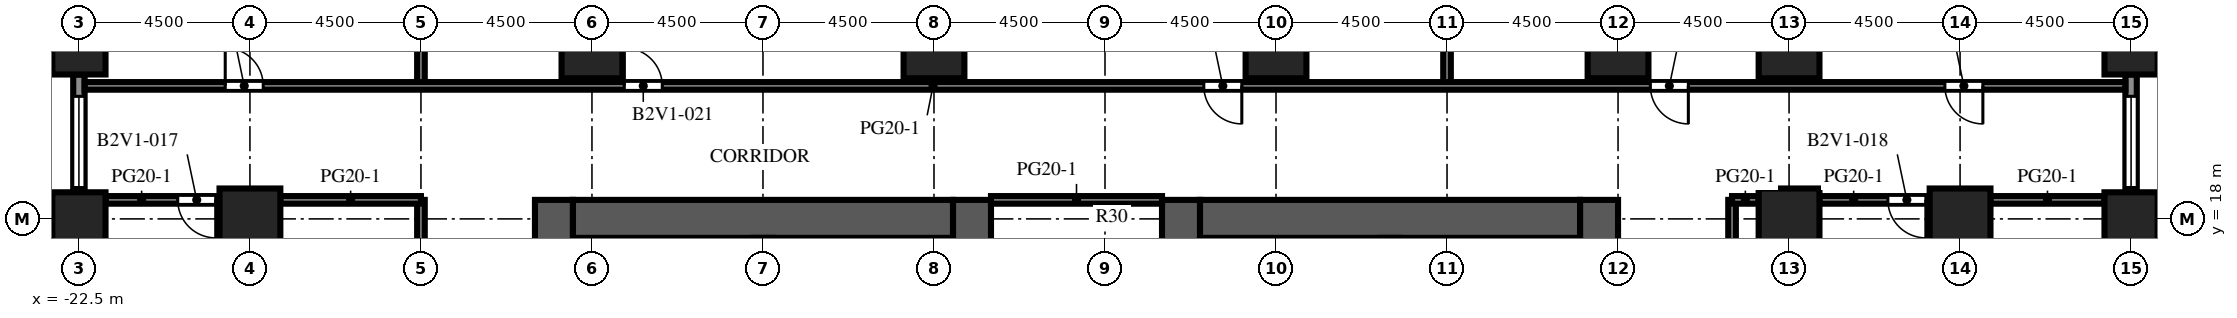
"""IFC4 building model, lengths in metres.
Left out: names, types, materials, properties, quantities, classifications, styles, units other than length and angle.
Written with IfcOpenShell. Run it as: python <this file> out.ifc"""

import sys

from ifc_helpers import new_model, si_unit, direction, frame, frame_2d, origin, origin_2d, place, context, subcontext, project, spatial, rectangle, extrude, element, fill, save


model = new_model("IFC4")
c1 = context("Model", 3, precision=1e-05, world=origin(), true_north=direction((0.0, 1.0)))
c2 = subcontext(c1, "Body", "Model", "MODEL_VIEW")
j1 = project(units=[si_unit("LENGTHUNIT", "METRE"), si_unit("PLANEANGLEUNIT", "RADIAN")], contexts=[c1])
p1 = place(None, origin())
s1 = spatial("IfcSite", under=j1, at=p1, CompositionType="ELEMENT")
p2 = place(p1, origin())
s2 = spatial("IfcBuilding", under=s1, at=p2, CompositionType="ELEMENT")
p3 = place(p2, frame((0.0, 0.0, 54.2)))
s3 = spatial("IfcBuildingStorey", under=s2, at=p3, CompositionType="ELEMENT", Elevation=54.2)
for number, where, z_axis, x_axis in (
    (1, (-22.5, 18.0, 0.0), (0.0, 0.0, 1.0), (1.0, 0.0, 0.0)),
    (2, (-22.5, 22.5, 0.0), (0.0, 0.0, 1.0), (1.0, 0.0, 0.0)),
    (3, (31.5, 18.0, 0.0), (0.0, 0.0, 1.0), (1.0, 0.0, 0.0)),
    (4, (31.5, 22.5, 0.0), (0.0, 0.0, 1.0), (1.0, 0.0, 0.0)),
):
    element("IfcColumn", number, at=place(p3, frame(where, z_axis=z_axis, x_axis=x_axis)), inside=s3, PredefinedType="COLUMN", context=c2, shape_type="SweptSolid", body=[
        extrude(rectangle(XDim=1.4, YDim=1.4, at=origin_2d()), origin(), (0.0, 0.0, 1.0), 4.1),
    ])
for number, where, z_axis, x_axis in (
    (5, (-18.0, 18.0, 0.0), (0.0, 0.0, 1.0), (1.0, 0.0, 0.0)),
    (6, (-9.0, 22.5, 0.0), (0.0, 0.0, 1.0), (1.0, 0.0, 0.0)),
    (7, (0.0, 22.5, 0.0), (0.0, 0.0, 1.0), (1.0, 0.0, 0.0)),
    (8, (9.0, 22.5, 0.0), (0.0, 0.0, 1.0), (1.0, 0.0, 0.0)),
    (9, (18.0, 22.5, 0.0), (0.0, 0.0, 1.0), (1.0, 0.0, 0.0)),
    (10, (22.5, 18.0, 0.0), (0.0, 0.0, 1.0), (1.0, 0.0, 0.0)),
    (11, (22.5, 22.5, 0.0), (0.0, 0.0, 1.0), (1.0, 0.0, 0.0)),
    (12, (27.0, 18.0, 0.0), (0.0, 0.0, 1.0), (1.0, 0.0, 0.0)),
):
    element("IfcColumn", number, at=place(p3, frame(where, z_axis=z_axis, x_axis=x_axis)), inside=s3, PredefinedType="COLUMN", context=c2, shape_type="SweptSolid", body=[
        extrude(rectangle(XDim=1.6, YDim=1.6, at=origin_2d()), origin(), (0.0, 0.0, 1.0), 4.1),
    ])
p4 = place(p3, frame((-10.0, -9.0, 0.0), z_axis=(0.0, 0.0, 1.0), x_axis=(0.0, 1.0, 0.0)))
e13 = element("IfcWall", 13, at=p4, inside=s3, PredefinedType="SHEAR", context=c2, shape_type="SweptSolid", body=[
    extrude(rectangle(XDim=27.5, YDim=1.0, at=frame_2d((13.75, 0.0))), origin(), (0.0, 0.0, 1.0), 4.1),
])
p5 = place(p4, frame((12.55, 0.0, 0.0)))
e14 = element("IfcOpeningElement", 14, at=p5, cuts=e13, PredefinedType="OPENING", context=c2, shape_type="SweptSolid", body=[
    extrude(rectangle(XDim=2.4, YDim=2.4, at=frame_2d((1.2, 1.2))), frame((0.0, 0.51, 0.0), z_axis=(0.0, -1.0, 0.0), x_axis=(1.0, 0.0, 0.0)), (0.0, 0.0, 1.0), 1.02),
])
p6 = place(p4, frame((6.825, 0.0, 0.0)))
e15 = element("IfcOpeningElement", 15, at=p6, cuts=e13, PredefinedType="OPENING", context=c2, shape_type="SweptSolid", body=[
    extrude(rectangle(XDim=1.2, YDim=2.1, at=frame_2d((0.6, 1.05))), frame((0.0, 0.51, 0.0), z_axis=(0.0, -1.0, 0.0), x_axis=(1.0, 0.0, 0.0)), (0.0, 0.0, 1.0), 1.02),
])
p7 = place(p4, frame((19.475, 0.0, 0.0)))
e16 = element("IfcOpeningElement", 16, at=p7, cuts=e13, PredefinedType="OPENING", context=c2, shape_type="SweptSolid", body=[
    extrude(rectangle(XDim=1.2, YDim=2.1, at=frame_2d((0.6, 1.05))), frame((0.0, 0.51, 0.0), z_axis=(0.0, -1.0, 0.0), x_axis=(1.0, 0.0, 0.0)), (0.0, 0.0, 1.0), 1.02),
])
p8 = place(p3, frame((1.0, -9.0, 0.0), z_axis=(0.0, 0.0, 1.0), x_axis=(0.0, 1.0, 0.0)))
e17 = element("IfcWall", 17, at=p8, inside=s3, PredefinedType="SHEAR", context=c2, shape_type="SweptSolid", body=[
    extrude(rectangle(XDim=27.5, YDim=1.0, at=frame_2d((13.75, 0.0))), origin(), (0.0, 0.0, 1.0), 4.1),
])
p9 = place(p8, frame((12.55, 0.0, 0.0)))
e18 = element("IfcOpeningElement", 18, at=p9, cuts=e17, PredefinedType="OPENING", context=c2, shape_type="SweptSolid", body=[
    extrude(rectangle(XDim=2.4, YDim=2.4, at=frame_2d((1.2, 1.2))), frame((0.0, 0.51, 0.0), z_axis=(0.0, -1.0, 0.0), x_axis=(1.0, 0.0, 0.0)), (0.0, 0.0, 1.0), 1.02),
])
p10 = place(p8, frame((4.025, 0.0, 0.0)))
e19 = element("IfcOpeningElement", 19, at=p10, cuts=e17, PredefinedType="OPENING", context=c2, shape_type="SweptSolid", body=[
    extrude(rectangle(XDim=1.2, YDim=2.1, at=frame_2d((0.6, 1.05))), frame((0.0, 0.51, 0.0), z_axis=(0.0, -1.0, 0.0), x_axis=(1.0, 0.0, 0.0)), (0.0, 0.0, 1.0), 1.02),
])
p11 = place(p8, frame((22.275, 0.0, 0.0)))
e20 = element("IfcOpeningElement", 20, at=p11, cuts=e17, PredefinedType="OPENING", context=c2, shape_type="SweptSolid", body=[
    extrude(rectangle(XDim=1.2, YDim=2.1, at=frame_2d((0.6, 1.05))), frame((0.0, 0.51, 0.0), z_axis=(0.0, -1.0, 0.0), x_axis=(1.0, 0.0, 0.0)), (0.0, 0.0, 1.0), 1.02),
])
p12 = place(p3, frame((-9.5, 18.0, 0.0), z_axis=(0.0, 0.0, 1.0), x_axis=(1.0, 0.0, 0.0)))
e21 = element("IfcWall", 21, at=p12, inside=s3, PredefinedType="SHEAR", context=c2, shape_type="SweptSolid", body=[
    extrude(rectangle(XDim=10.0, YDim=1.0, at=frame_2d((5.0, 0.0))), origin(), (0.0, 0.0, 1.0), 4.1),
])
p13 = place(p3, frame((6.5, -9.0, 0.0), z_axis=(0.0, 0.0, 1.0), x_axis=(0.0, 1.0, 0.0)))
e22 = element("IfcWall", 22, at=p13, inside=s3, PredefinedType="SHEAR", context=c2, shape_type="SweptSolid", body=[
    extrude(rectangle(XDim=27.5, YDim=1.0, at=frame_2d((13.75, 0.0))), origin(), (0.0, 0.0, 1.0), 4.1),
])
p14 = place(p13, frame((12.55, 0.0, 0.0)))
e23 = element("IfcOpeningElement", 23, at=p14, cuts=e22, PredefinedType="OPENING", context=c2, shape_type="SweptSolid", body=[
    extrude(rectangle(XDim=2.4, YDim=2.4, at=frame_2d((1.2, 1.2))), frame((0.0, 0.51, 0.0), z_axis=(0.0, -1.0, 0.0), x_axis=(1.0, 0.0, 0.0)), (0.0, 0.0, 1.0), 1.02),
])
p15 = place(p13, frame((4.025, 0.0, 0.0)))
e24 = element("IfcOpeningElement", 24, at=p15, cuts=e22, PredefinedType="OPENING", context=c2, shape_type="SweptSolid", body=[
    extrude(rectangle(XDim=1.2, YDim=2.1, at=frame_2d((0.6, 1.05))), frame((0.0, 0.51, 0.0), z_axis=(0.0, -1.0, 0.0), x_axis=(1.0, 0.0, 0.0)), (0.0, 0.0, 1.0), 1.02),
])
p16 = place(p13, frame((22.275, 0.0, 0.0)))
e25 = element("IfcOpeningElement", 25, at=p16, cuts=e22, PredefinedType="OPENING", context=c2, shape_type="SweptSolid", body=[
    extrude(rectangle(XDim=1.2, YDim=2.1, at=frame_2d((0.6, 1.05))), frame((0.0, 0.51, 0.0), z_axis=(0.0, -1.0, 0.0), x_axis=(1.0, 0.0, 0.0)), (0.0, 0.0, 1.0), 1.02),
])
p17 = place(p3, frame((17.5, -9.0, 0.0), z_axis=(0.0, 0.0, 1.0), x_axis=(0.0, 1.0, 0.0)))
e26 = element("IfcWall", 26, at=p17, inside=s3, PredefinedType="SHEAR", context=c2, shape_type="SweptSolid", body=[
    extrude(rectangle(XDim=27.5, YDim=1.0, at=frame_2d((13.75, 0.0))), origin(), (0.0, 0.0, 1.0), 4.1),
])
p18 = place(p17, frame((12.55, 0.0, 0.0)))
e27 = element("IfcOpeningElement", 27, at=p18, cuts=e26, PredefinedType="OPENING", context=c2, shape_type="SweptSolid", body=[
    extrude(rectangle(XDim=2.4, YDim=2.4, at=frame_2d((1.2, 1.2))), frame((0.0, 0.51, 0.0), z_axis=(0.0, -1.0, 0.0), x_axis=(1.0, 0.0, 0.0)), (0.0, 0.0, 1.0), 1.02),
])
p19 = place(p17, frame((6.825, 0.0, 0.0)))
e28 = element("IfcOpeningElement", 28, at=p19, cuts=e26, PredefinedType="OPENING", context=c2, shape_type="SweptSolid", body=[
    extrude(rectangle(XDim=1.2, YDim=2.1, at=frame_2d((0.6, 1.05))), frame((0.0, 0.51, 0.0), z_axis=(0.0, -1.0, 0.0), x_axis=(1.0, 0.0, 0.0)), (0.0, 0.0, 1.0), 1.02),
])
p20 = place(p17, frame((19.475, 0.0, 0.0)))
e29 = element("IfcOpeningElement", 29, at=p20, cuts=e26, PredefinedType="OPENING", context=c2, shape_type="SweptSolid", body=[
    extrude(rectangle(XDim=1.2, YDim=2.1, at=frame_2d((0.6, 1.05))), frame((0.0, 0.51, 0.0), z_axis=(0.0, -1.0, 0.0), x_axis=(1.0, 0.0, 0.0)), (0.0, 0.0, 1.0), 1.02),
])
p21 = place(p3, frame((7.0, 18.0, 0.0), z_axis=(0.0, 0.0, 1.0), x_axis=(1.0, 0.0, 0.0)))
e30 = element("IfcWall", 30, at=p21, inside=s3, PredefinedType="SHEAR", context=c2, shape_type="SweptSolid", body=[
    extrude(rectangle(XDim=10.0, YDim=1.0, at=frame_2d((5.0, 0.0))), origin(), (0.0, 0.0, 1.0), 4.1),
])
p22 = place(p3, frame((31.5, 21.8, 0.0), z_axis=(0.0, 0.0, 1.0), x_axis=(0.0, -1.0, 0.0)))
e31 = element("IfcWall", 31, at=p22, inside=s3, PredefinedType="SOLIDWALL", context=c2, shape_type="SweptSolid", body=[
    extrude(rectangle(XDim=3.1, YDim=0.3, at=frame_2d((1.55, 0.0))), origin(), (0.0, 0.0, 1.0), 2.75),
])
p23 = place(p22, frame((0.575, 0.0, 0.8)))
e32 = element("IfcOpeningElement", 32, at=p23, cuts=e31, PredefinedType="OPENING", context=c2, shape_type="SweptSolid", body=[
    extrude(rectangle(XDim=2.4, YDim=1.7, at=frame_2d((1.2, 0.85))), frame((0.0, 0.16, 0.0), z_axis=(0.0, -1.0, 0.0), x_axis=(1.0, 0.0, 0.0)), (0.0, 0.0, 1.0), 0.32),
])
p24 = place(p3, frame((-22.5, 18.7, 0.0), z_axis=(0.0, 0.0, 1.0), x_axis=(0.0, 1.0, 0.0)))
e33 = element("IfcWall", 33, at=p24, inside=s3, PredefinedType="SOLIDWALL", context=c2, shape_type="SweptSolid", body=[
    extrude(rectangle(XDim=3.1, YDim=0.3, at=frame_2d((1.55, 0.0))), origin(), (0.0, 0.0, 1.0), 2.75),
])
p25 = place(p24, frame((0.125, 0.0, 0.8)))
e34 = element("IfcOpeningElement", 34, at=p25, cuts=e33, PredefinedType="OPENING", context=c2, shape_type="SweptSolid", body=[
    extrude(rectangle(XDim=2.4, YDim=1.7, at=frame_2d((1.2, 0.85))), frame((0.0, 0.16, 0.0), z_axis=(0.0, -1.0, 0.0), x_axis=(1.0, 0.0, 0.0)), (0.0, 0.0, 1.0), 0.32),
])
p26 = place(p3, frame((-13.5, -9.0, 0.0), z_axis=(0.0, 0.0, 1.0), x_axis=(0.0, 1.0, 0.0)))
e35 = element("IfcWall", 35, at=p26, inside=s3, PredefinedType="PARTITIONING", context=c2, shape_type="SweptSolid", body=[
    extrude(rectangle(XDim=27.5, YDim=0.2, at=frame_2d((13.75, 0.0))), origin(), (0.0, 0.0, 1.0), 3.65),
])
p27 = place(p26, frame((5.1, 0.0, 0.0)))
e36 = element("IfcOpeningElement", 36, at=p27, cuts=e35, PredefinedType="OPENING", context=c2, shape_type="SweptSolid", body=[
    extrude(rectangle(XDim=1.0, YDim=2.1, at=frame_2d((0.5, 1.05))), frame((0.0, 0.11, 0.0), z_axis=(0.0, -1.0, 0.0), x_axis=(1.0, 0.0, 0.0)), (0.0, 0.0, 1.0), 0.22),
])
p28 = place(p26, frame((15.6, 0.0, 0.0)))
e37 = element("IfcOpeningElement", 37, at=p28, cuts=e35, PredefinedType="OPENING", context=c2, shape_type="SweptSolid", body=[
    extrude(rectangle(XDim=1.0, YDim=2.1, at=frame_2d((0.5, 1.05))), frame((0.0, 0.11, 0.0), z_axis=(0.0, -1.0, 0.0), x_axis=(1.0, 0.0, 0.0)), (0.0, 0.0, 1.0), 0.22),
])
for number, where, z_axis, x_axis in (
    (38, (-13.5, 21.5, 0.0), (0.0, 0.0, 1.0), (0.0, 1.0, 0.0)),
    (39, (13.5, 21.5, 0.0), (0.0, 0.0, 1.0), (0.0, 1.0, 0.0)),
):
    element("IfcWall", number, at=place(p3, frame(where, z_axis=z_axis, x_axis=x_axis)), inside=s3, PredefinedType="PARTITIONING", context=c2, shape_type="SweptSolid", body=[
        extrude(rectangle(XDim=4.8, YDim=0.2, at=frame_2d((2.4, 0.0))), origin(), (0.0, 0.0, 1.0), 3.65),
    ])
p29 = place(p3, frame((21.0, 18.5, 0.0), z_axis=(0.0, 0.0, 1.0), x_axis=(0.0, -1.0, 0.0)))
e40 = element("IfcWall", 40, at=p29, inside=s3, PredefinedType="PARTITIONING", context=c2, shape_type="SweptSolid", body=[
    extrude(rectangle(XDim=27.5, YDim=0.2, at=frame_2d((13.75, 0.0))), origin(), (0.0, 0.0, 1.0), 3.65),
])
p30 = place(p29, frame((10.9, 0.0, 0.0)))
e41 = element("IfcOpeningElement", 41, at=p30, cuts=e40, PredefinedType="OPENING", context=c2, shape_type="SweptSolid", body=[
    extrude(rectangle(XDim=1.0, YDim=2.1, at=frame_2d((0.5, 1.05))), frame((0.0, 0.11, 0.0), z_axis=(0.0, -1.0, 0.0), x_axis=(1.0, 0.0, 0.0)), (0.0, 0.0, 1.0), 0.22),
])
p31 = place(p3, frame((-18.8, 18.5, 0.0), z_axis=(0.0, 0.0, 1.0), x_axis=(-1.0, 0.0, 0.0)))
e42 = element("IfcWall", 42, at=p31, inside=s3, PredefinedType="PARTITIONING", context=c2, shape_type="SweptSolid", body=[
    extrude(rectangle(XDim=3.0, YDim=0.2, at=frame_2d((1.5, 0.0))), origin(), (0.0, 0.0, 1.0), 3.65),
])
p32 = place(p31, frame((0.1, 0.0, 0.0)))
e43 = element("IfcOpeningElement", 43, at=p32, cuts=e42, PredefinedType="OPENING", context=c2, shape_type="SweptSolid", body=[
    extrude(rectangle(XDim=1.0, YDim=2.1, at=frame_2d((0.5, 1.05))), frame((0.0, 0.11, 0.0), z_axis=(0.0, -1.0, 0.0), x_axis=(1.0, 0.0, 0.0)), (0.0, 0.0, 1.0), 0.22),
])
p33 = place(p3, frame((-17.2, 18.5, 0.0), z_axis=(0.0, 0.0, 1.0), x_axis=(1.0, 0.0, 0.0)))
e44 = element("IfcWall", 44, at=p33, inside=s3, PredefinedType="PARTITIONING", context=c2, shape_type="SweptSolid", body=[
    extrude(rectangle(XDim=3.7, YDim=0.2, at=frame_2d((1.85, 0.0))), origin(), (0.0, 0.0, 1.0), 3.65),
])
p34 = place(p3, frame((1.5, 18.5, 0.0), z_axis=(0.0, 0.0, 1.0), x_axis=(1.0, 0.0, 0.0)))
e45 = element("IfcWall", 45, at=p34, inside=s3, PredefinedType="PARTITIONING", context=c2, shape_type="SweptSolid", body=[
    extrude(rectangle(XDim=4.5, YDim=0.2, at=frame_2d((2.25, 0.0))), origin(), (0.0, 0.0, 1.0), 3.65),
])
p35 = place(p3, frame((21.0, 18.5, 0.0), z_axis=(0.0, 0.0, 1.0), x_axis=(1.0, 0.0, 0.0)))
e46 = element("IfcWall", 46, at=p35, inside=s3, PredefinedType="PARTITIONING", context=c2, shape_type="SweptSolid", body=[
    extrude(rectangle(XDim=0.7, YDim=0.2, at=frame_2d((0.35, 0.0))), origin(), (0.0, 0.0, 1.0), 3.65),
])
p36 = place(p3, frame((26.2, 18.5, 0.0), z_axis=(0.0, 0.0, 1.0), x_axis=(-1.0, 0.0, 0.0)))
e47 = element("IfcWall", 47, at=p36, inside=s3, PredefinedType="PARTITIONING", context=c2, shape_type="SweptSolid", body=[
    extrude(rectangle(XDim=2.9, YDim=0.2, at=frame_2d((1.45, 0.0))), origin(), (0.0, 0.0, 1.0), 3.65),
])
p37 = place(p36, frame((0.1, 0.0, 0.0)))
e48 = element("IfcOpeningElement", 48, at=p37, cuts=e47, PredefinedType="OPENING", context=c2, shape_type="SweptSolid", body=[
    extrude(rectangle(XDim=1.0, YDim=2.1, at=frame_2d((0.5, 1.05))), frame((0.0, 0.11, 0.0), z_axis=(0.0, -1.0, 0.0), x_axis=(1.0, 0.0, 0.0)), (0.0, 0.0, 1.0), 0.22),
])
p38 = place(p3, frame((27.8, 18.5, 0.0), z_axis=(0.0, 0.0, 1.0), x_axis=(1.0, 0.0, 0.0)))
e49 = element("IfcWall", 49, at=p38, inside=s3, PredefinedType="PARTITIONING", context=c2, shape_type="SweptSolid", body=[
    extrude(rectangle(XDim=3.0, YDim=0.2, at=frame_2d((1.5, 0.0))), origin(), (0.0, 0.0, 1.0), 3.65),
])
p39 = place(p3, frame((-22.35, 21.5, 0.0), z_axis=(0.0, 0.0, 1.0), x_axis=(1.0, 0.0, 0.0)))
e50 = element("IfcWall", 50, at=p39, inside=s3, PredefinedType="PARTITIONING", context=c2, shape_type="SweptSolid", body=[
    extrude(rectangle(XDim=53.7, YDim=0.2, at=frame_2d((26.85, 0.0))), origin(), (0.0, 0.0, 1.0), 3.65),
])
p40 = place(p39, frame((3.7, 0.0, 0.0)))
e51 = element("IfcOpeningElement", 51, at=p40, cuts=e50, PredefinedType="OPENING", context=c2, shape_type="SweptSolid", body=[
    extrude(rectangle(XDim=1.0, YDim=2.1, at=frame_2d((0.5, 1.05))), frame((0.0, 0.11, 0.0), z_axis=(0.0, -1.0, 0.0), x_axis=(1.0, 0.0, 0.0)), (0.0, 0.0, 1.0), 0.22),
])
p41 = place(p39, frame((14.2, 0.0, 0.0)))
e52 = element("IfcOpeningElement", 52, at=p41, cuts=e50, PredefinedType="OPENING", context=c2, shape_type="SweptSolid", body=[
    extrude(rectangle(XDim=1.0, YDim=2.1, at=frame_2d((0.5, 1.05))), frame((0.0, 0.11, 0.0), z_axis=(0.0, -1.0, 0.0), x_axis=(1.0, 0.0, 0.0)), (0.0, 0.0, 1.0), 0.22),
])
p42 = place(p39, frame((29.45, 0.0, 0.0)))
e53 = element("IfcOpeningElement", 53, at=p42, cuts=e50, PredefinedType="OPENING", context=c2, shape_type="SweptSolid", body=[
    extrude(rectangle(XDim=1.0, YDim=2.1, at=frame_2d((0.5, 1.05))), frame((0.0, 0.11, 0.0), z_axis=(0.0, -1.0, 0.0), x_axis=(1.0, 0.0, 0.0)), (0.0, 0.0, 1.0), 0.22),
])
p43 = place(p39, frame((41.2, 0.0, 0.0)))
e54 = element("IfcOpeningElement", 54, at=p43, cuts=e50, PredefinedType="OPENING", context=c2, shape_type="SweptSolid", body=[
    extrude(rectangle(XDim=1.0, YDim=2.1, at=frame_2d((0.5, 1.05))), frame((0.0, 0.11, 0.0), z_axis=(0.0, -1.0, 0.0), x_axis=(1.0, 0.0, 0.0)), (0.0, 0.0, 1.0), 0.22),
])
p44 = place(p39, frame((48.95, 0.0, 0.0)))
e55 = element("IfcOpeningElement", 55, at=p44, cuts=e50, PredefinedType="OPENING", context=c2, shape_type="SweptSolid", body=[
    extrude(rectangle(XDim=1.0, YDim=2.1, at=frame_2d((0.5, 1.05))), frame((0.0, 0.11, 0.0), z_axis=(0.0, -1.0, 0.0), x_axis=(1.0, 0.0, 0.0)), (0.0, 0.0, 1.0), 0.22),
])
p45 = place(p23, origin())
e56 = element("IfcWindow", 56, at=p45, inside=s3, PartitioningType="SINGLE_PANEL", PredefinedType="WINDOW", context=c2, shape_type="SweptSolid", body=[
    extrude(rectangle(XDim=2.4, YDim=1.7, at=frame_2d((1.2, 0.85))), frame((0.0, 0.03, 0.0), z_axis=(0.0, -1.0, 0.0), x_axis=(1.0, 0.0, 0.0)), (0.0, 0.0, 1.0), 0.06),
])
fill(e32, e56)
p46 = place(p25, origin())
e57 = element("IfcWindow", 57, at=p46, inside=s3, PartitioningType="SINGLE_PANEL", PredefinedType="WINDOW", context=c2, shape_type="SweptSolid", body=[
    extrude(rectangle(XDim=2.4, YDim=1.7, at=frame_2d((1.2, 0.85))), frame((0.0, 0.03, 0.0), z_axis=(0.0, -1.0, 0.0), x_axis=(1.0, 0.0, 0.0)), (0.0, 0.0, 1.0), 0.06),
])
fill(e34, e57)
p47 = place(p32, origin())
e58 = element("IfcDoor", 58, at=p47, inside=s3, OperationType="SINGLE_SWING_LEFT", PredefinedType="DOOR", context=c2, shape_type="SweptSolid", body=[
    extrude(rectangle(XDim=1.0, YDim=2.1, at=frame_2d((0.5, 1.05))), frame((0.0, 0.025, 0.0), z_axis=(0.0, -1.0, 0.0), x_axis=(1.0, 0.0, 0.0)), (0.0, 0.0, 1.0), 0.05),
])
fill(e43, e58)
p48 = place(p37, origin())
e59 = element("IfcDoor", 59, at=p48, inside=s3, OperationType="SINGLE_SWING_LEFT", PredefinedType="DOOR", context=c2, shape_type="SweptSolid", body=[
    extrude(rectangle(XDim=1.0, YDim=2.1, at=frame_2d((0.5, 1.05))), frame((0.0, 0.025, 0.0), z_axis=(0.0, -1.0, 0.0), x_axis=(1.0, 0.0, 0.0)), (0.0, 0.0, 1.0), 0.05),
])
fill(e48, e59)
p49 = place(p40, origin())
e60 = element("IfcDoor", 60, at=p49, inside=s3, OperationType="SINGLE_SWING_LEFT", PredefinedType="DOOR", context=c2, shape_type="SweptSolid", body=[
    extrude(rectangle(XDim=1.0, YDim=2.1, at=frame_2d((0.5, 1.05))), frame((0.0, 0.025, 0.0), z_axis=(0.0, -1.0, 0.0), x_axis=(1.0, 0.0, 0.0)), (0.0, 0.0, 1.0), 0.05),
])
fill(e51, e60)
p50 = place(p41, origin())
e61 = element("IfcDoor", 61, at=p50, inside=s3, OperationType="SINGLE_SWING_LEFT", PredefinedType="DOOR", context=c2, shape_type="SweptSolid", body=[
    extrude(rectangle(XDim=1.0, YDim=2.1, at=frame_2d((0.5, 1.05))), frame((0.0, 0.025, 0.0), z_axis=(0.0, -1.0, 0.0), x_axis=(1.0, 0.0, 0.0)), (0.0, 0.0, 1.0), 0.05),
])
fill(e52, e61)
p51 = place(p42, origin())
e62 = element("IfcDoor", 62, at=p51, inside=s3, OperationType="SINGLE_SWING_RIGHT", PredefinedType="DOOR", context=c2, shape_type="SweptSolid", body=[
    extrude(rectangle(XDim=1.0, YDim=2.1, at=frame_2d((0.5, 1.05))), frame((0.0, 0.025, 0.0), z_axis=(0.0, -1.0, 0.0), x_axis=(1.0, 0.0, 0.0)), (0.0, 0.0, 1.0), 0.05),
])
fill(e53, e62)
p52 = place(p43, origin())
e63 = element("IfcDoor", 63, at=p52, inside=s3, OperationType="SINGLE_SWING_RIGHT", PredefinedType="DOOR", context=c2, shape_type="SweptSolid", body=[
    extrude(rectangle(XDim=1.0, YDim=2.1, at=frame_2d((0.5, 1.05))), frame((0.0, 0.025, 0.0), z_axis=(0.0, -1.0, 0.0), x_axis=(1.0, 0.0, 0.0)), (0.0, 0.0, 1.0), 0.05),
])
fill(e54, e63)
p53 = place(p44, origin())
e64 = element("IfcDoor", 64, at=p53, inside=s3, OperationType="SINGLE_SWING_RIGHT", PredefinedType="DOOR", context=c2, shape_type="SweptSolid", body=[
    extrude(rectangle(XDim=1.0, YDim=2.1, at=frame_2d((0.5, 1.05))), frame((0.0, 0.025, 0.0), z_axis=(0.0, -1.0, 0.0), x_axis=(1.0, 0.0, 0.0)), (0.0, 0.0, 1.0), 0.05),
])
fill(e55, e64)
save(model, sys.argv[1])
